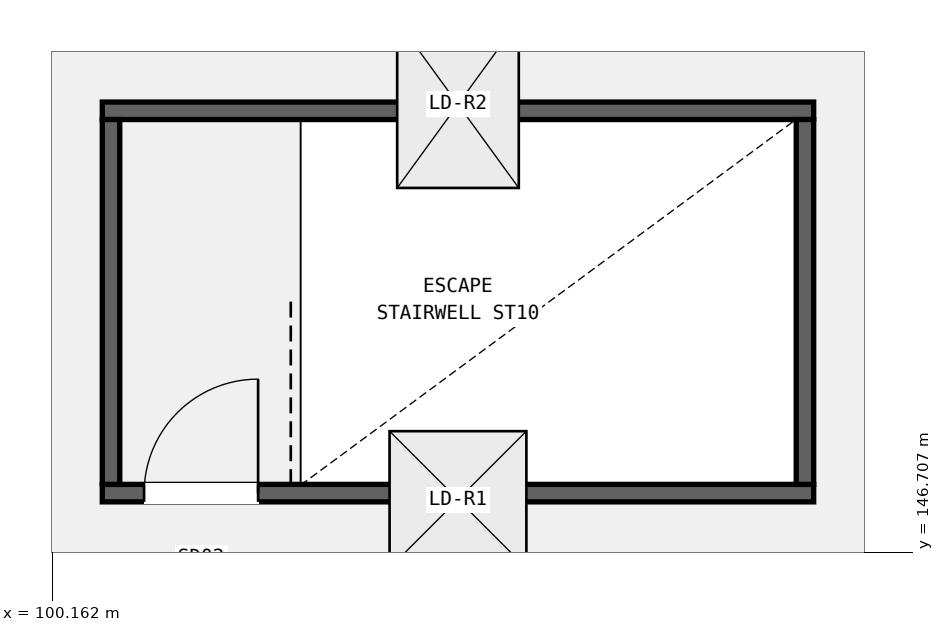
"""IFC4 building model, lengths in metres.
Left out: names, types, materials, properties, quantities, classifications, styles, units other than length and angle.
Written with IfcOpenShell. Run it as: python <this file> out.ifc"""

import sys

from ifc_helpers import new_model, si_unit, direction, frame, frame_2d, origin, origin_2d, place, context, subcontext, project, spatial, rectangle, extrude, element, fill, save


model = new_model("IFC4")
c1 = context("Model", 3, precision=1e-05, world=origin(), true_north=direction((0.0, 1.0)))
c2 = subcontext(c1, "Body", "Model", "MODEL_VIEW")
j1 = project(units=[si_unit("LENGTHUNIT", "METRE"), si_unit("PLANEANGLEUNIT", "RADIAN")], contexts=[c1])
p1 = place(None, origin())
s1 = spatial("IfcSite", under=j1, at=p1, CompositionType="ELEMENT")
p2 = place(p1, origin())
s2 = spatial("IfcBuilding", under=s1, at=p2, CompositionType="ELEMENT")
p3 = place(p2, frame((0.0, 0.0, 25.8)))
s3 = spatial("IfcBuildingStorey", under=s2, at=p3, CompositionType="ELEMENT", Elevation=25.8)
p4 = place(p3, frame((100.82, 147.485, 0.0), z_axis=(0.0, 0.0, 1.0), x_axis=(1.0, 0.0, 0.0)))
e1 = element("IfcWall", 1, at=p4, inside=s3, PredefinedType="SHEAR", context=c2, shape_type="SweptSolid", body=[
    extrude(rectangle(XDim=9.36, YDim=0.23, at=frame_2d((4.68, 0.0))), origin(), (0.0, 0.0, 1.0), 5.04),
])
p5 = place(p4, frame((0.55, 0.0, 0.0)))
e2 = element("IfcOpeningElement", 2, at=p5, cuts=e1, PredefinedType="OPENING", context=c2, shape_type="SweptSolid", body=[
    extrude(rectangle(XDim=1.5, YDim=2.2, at=frame_2d((0.75, 1.1))), frame((0.0, 0.125, 0.0), z_axis=(0.0, -1.0, 0.0), x_axis=(1.0, 0.0, 0.0)), (0.0, 0.0, 1.0), 0.25),
])
p6 = place(p3, frame((100.82, 152.515, 0.0), z_axis=(0.0, 0.0, 1.0), x_axis=(1.0, 0.0, 0.0)))
e3 = element("IfcWall", 3, at=p6, inside=s3, PredefinedType="SHEAR", context=c2, shape_type="SweptSolid", body=[
    extrude(rectangle(XDim=9.36, YDim=0.23, at=frame_2d((4.68, 0.0))), origin(), (0.0, 0.0, 1.0), 5.04),
])
for number, where, z_axis, x_axis in (
    (4, (100.935, 147.6, 0.0), (0.0, 0.0, 1.0), (0.0, 1.0, 0.0)),
    (5, (110.065, 147.6, 0.0), (0.0, 0.0, 1.0), (0.0, 1.0, 0.0)),
):
    element("IfcWall", number, at=place(p3, frame(where, z_axis=z_axis, x_axis=x_axis)), inside=s3, PredefinedType="SHEAR", context=c2, shape_type="SweptSolid", body=[
        extrude(rectangle(XDim=4.8, YDim=0.23, at=frame_2d((2.4, 0.0))), origin(), (0.0, 0.0, 1.0), 5.04),
    ])
p7 = place(p2, frame((0.0, 0.0, 31.2)))
p8 = place(p7, frame((0.0, 0.0, -0.36)))
p9 = place(p8, frame((105.5, 147.4, 0.0)))
p10 = place(p9, frame((0.0, 0.0, 0.31)))
e6 = element("IfcWindow", 6, at=p10, inside=s3, PartitioningType="SINGLE_PANEL", PredefinedType="LIGHTDOME", context=c2, shape_type="SweptSolid", body=[
    extrude(rectangle(XDim=1.8, YDim=1.8, at=origin_2d()), origin(), (0.0, 0.0, 1.0), 0.05),
])
p11 = place(p8, frame((105.5, 152.6, 0.0)))
p12 = place(p11, frame((0.0, 0.0, 0.31)))
e7 = element("IfcWindow", 7, at=p12, inside=s3, PartitioningType="SINGLE_PANEL", PredefinedType="LIGHTDOME", context=c2, shape_type="SweptSolid", body=[
    extrude(rectangle(XDim=2.2, YDim=1.6, at=origin_2d()), origin(), (0.0, 0.0, 1.0), 0.05),
])
p13 = place(p5, origin())
e8 = element("IfcDoor", 8, at=p13, inside=s3, OperationType="SINGLE_SWING_RIGHT", PredefinedType="DOOR", context=c2, shape_type="SweptSolid", body=[
    extrude(rectangle(XDim=1.5, YDim=2.2, at=frame_2d((0.75, 1.1))), frame((0.0, 0.025, 0.0), z_axis=(0.0, -1.0, 0.0), x_axis=(1.0, 0.0, 0.0)), (0.0, 0.0, 1.0), 0.05),
])
fill(e2, e8)
save(model, sys.argv[1])
